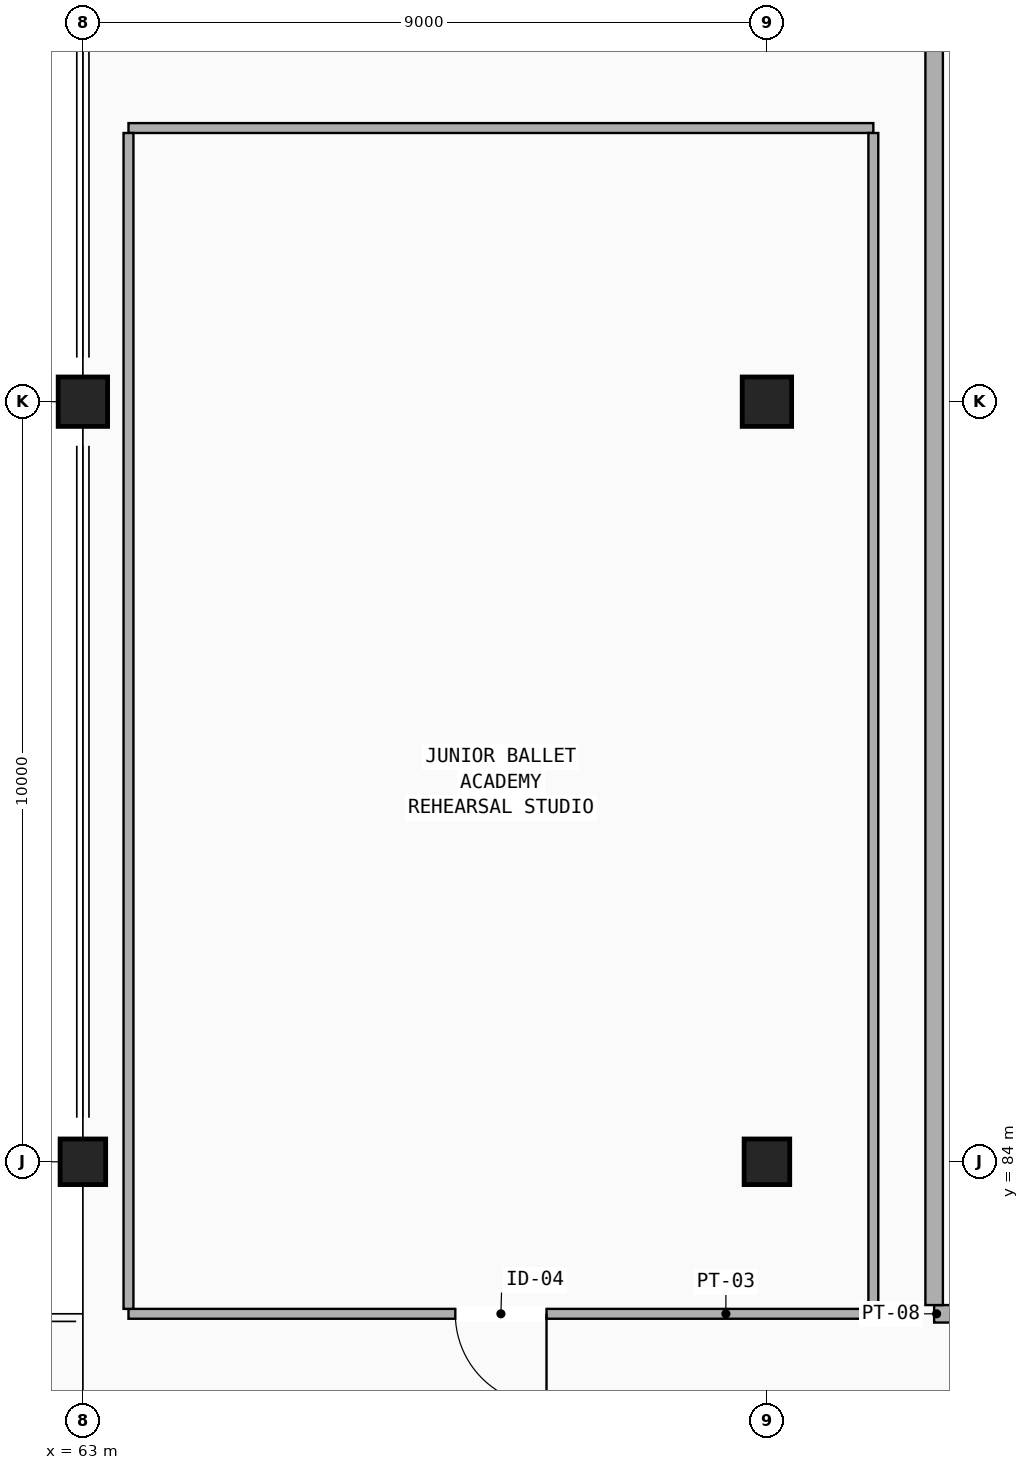
"""IFC4 building model, lengths in metres.
Left out: names, types, materials, properties, quantities, classifications, styles, units other than length and angle.
Written with IfcOpenShell. Run it as: python <this file> out.ifc"""

import sys

from ifc_helpers import new_model, si_unit, direction, frame, frame_2d, origin, origin_2d, place, context, subcontext, project, spatial, rectangle, extrude, element, fill, save


model = new_model("IFC4")
c1 = context("Model", 3, precision=1e-05, world=origin(), true_north=direction((0.0, 1.0)))
c2 = subcontext(c1, "Body", "Model", "MODEL_VIEW")
j1 = project(units=[si_unit("LENGTHUNIT", "METRE"), si_unit("PLANEANGLEUNIT", "RADIAN")], contexts=[c1])
p1 = place(None, origin())
s1 = spatial("IfcSite", under=j1, at=p1, CompositionType="ELEMENT")
p2 = place(p1, origin())
s2 = spatial("IfcBuilding", under=s1, at=p2, CompositionType="ELEMENT")
p3 = place(p2, frame((0.0, 0.0, 13.6)))
s3 = spatial("IfcBuildingStorey", under=s2, at=p3, CompositionType="ELEMENT", Elevation=13.6)
p4 = place(p3, frame((63.0, 84.0, 0.0), z_axis=(0.0, 0.0, 1.0), x_axis=(1.0, 0.0, 0.0)))
e1 = element("IfcColumn", 1, at=p4, inside=s3, PredefinedType="COLUMN", context=c2, shape_type="SweptSolid", body=[
    extrude(rectangle(XDim=0.6, YDim=0.6, at=origin_2d()), origin(), (0.0, 0.0, 1.0), 4.08),
])
p5 = place(p3, frame((63.0, 94.0, 0.0), z_axis=(0.0, 0.0, 1.0), x_axis=(1.0, 0.0, 0.0)))
e2 = element("IfcColumn", 2, at=p5, inside=s3, PredefinedType="COLUMN", context=c2, shape_type="SweptSolid", body=[
    extrude(rectangle(XDim=0.65, YDim=0.65, at=origin_2d()), origin(), (0.0, 0.0, 1.0), 4.08),
])
p6 = place(p3, frame((72.0, 84.0, 0.0), z_axis=(0.0, 0.0, 1.0), x_axis=(1.0, 0.0, 0.0)))
e3 = element("IfcColumn", 3, at=p6, inside=s3, PredefinedType="COLUMN", context=c2, shape_type="SweptSolid", body=[
    extrude(rectangle(XDim=0.6, YDim=0.6, at=origin_2d()), origin(), (0.0, 0.0, 1.0), 4.08),
])
p7 = place(p3, frame((72.0, 94.0, 0.0), z_axis=(0.0, 0.0, 1.0), x_axis=(1.0, 0.0, 0.0)))
e4 = element("IfcColumn", 4, at=p7, inside=s3, PredefinedType="COLUMN", context=c2, shape_type="SweptSolid", body=[
    extrude(rectangle(XDim=0.65, YDim=0.65, at=origin_2d()), origin(), (0.0, 0.0, 1.0), 4.08),
])
p8 = place(p3, frame((74.2, 82.0, 0.0), z_axis=(0.0, 0.0, 1.0), x_axis=(1.0, 0.0, 0.0)))
e5 = element("IfcWall", 5, at=p8, inside=s3, PredefinedType="PARTITIONING", context=c2, shape_type="SweptSolid", body=[
    extrude(rectangle(XDim=2.0, YDim=0.23, at=frame_2d((1.0, 0.0))), origin(), (0.0, 0.0, 1.0), 3.84),
])
p9 = place(p8, frame((0.45, 0.0, 0.0)))
e6 = element("IfcOpeningElement", 6, at=p9, cuts=e5, PredefinedType="OPENING", context=c2, shape_type="SweptSolid", body=[
    extrude(rectangle(XDim=1.1, YDim=2.2, at=frame_2d((0.55, 1.1))), frame((0.0, 0.125, 0.0), z_axis=(0.0, -1.0, 0.0), x_axis=(1.0, 0.0, 0.0)), (0.0, 0.0, 1.0), 0.25),
])
p10 = place(p3, frame((74.2, 82.115, 0.0), z_axis=(0.0, 0.0, 1.0), x_axis=(0.0, 1.0, 0.0)))
e7 = element("IfcWall", 7, at=p10, inside=s3, PredefinedType="PARTITIONING", context=c2, shape_type="SweptSolid", body=[
    extrude(rectangle(XDim=16.57, YDim=0.23, at=frame_2d((8.285, 0.0))), origin(), (0.0, 0.0, 1.0), 2.82),
])
p11 = place(p3, frame((63.6, 82.0, 0.0), z_axis=(0.0, 0.0, 1.0), x_axis=(1.0, 0.0, 0.0)))
e8 = element("IfcWall", 8, at=p11, inside=s3, PredefinedType="PARTITIONING", context=c2, shape_type="SweptSolid", body=[
    extrude(rectangle(XDim=9.8, YDim=0.13, at=frame_2d((4.9, 0.0))), origin(), (0.0, 0.0, 1.0), 2.94),
])
p12 = place(p11, frame((4.3, 0.0, 0.0)))
e9 = element("IfcOpeningElement", 9, at=p12, cuts=e8, PredefinedType="OPENING", context=c2, shape_type="SweptSolid", body=[
    extrude(rectangle(XDim=1.2, YDim=2.2, at=frame_2d((0.6, 1.1))), frame((0.0, 0.075, 0.0), z_axis=(0.0, -1.0, 0.0), x_axis=(1.0, 0.0, 0.0)), (0.0, 0.0, 1.0), 0.15),
])
p13 = place(p3, frame((63.6, 97.6, 0.0), z_axis=(0.0, 0.0, 1.0), x_axis=(1.0, 0.0, 0.0)))
e10 = element("IfcWall", 10, at=p13, inside=s3, PredefinedType="PARTITIONING", context=c2, shape_type="SweptSolid", body=[
    extrude(rectangle(XDim=9.8, YDim=0.13, at=frame_2d((4.9, 0.0))), origin(), (0.0, 0.0, 1.0), 3.14),
])
p14 = place(p3, frame((63.6, 82.065, 0.0), z_axis=(0.0, 0.0, 1.0), x_axis=(0.0, 1.0, 0.0)))
e11 = element("IfcWall", 11, at=p14, inside=s3, PredefinedType="PARTITIONING", context=c2, shape_type="SweptSolid", body=[
    extrude(rectangle(XDim=15.47, YDim=0.13, at=frame_2d((7.735, 0.0))), origin(), (0.0, 0.0, 1.0), 2.92),
])
p15 = place(p3, frame((73.4, 82.065, 0.0), z_axis=(0.0, 0.0, 1.0), x_axis=(0.0, 1.0, 0.0)))
e12 = element("IfcWall", 12, at=p15, inside=s3, PredefinedType="PARTITIONING", context=c2, shape_type="SweptSolid", body=[
    extrude(rectangle(XDim=15.47, YDim=0.13, at=frame_2d((7.735, 0.0))), origin(), (0.0, 0.0, 1.0), 2.82),
])
p16 = place(p12, frame((1.2, 0.0, 0.0), z_axis=(0.0, 0.0, 1.0), x_axis=(-1.0, 0.0, 0.0)))
e13 = element("IfcDoor", 13, at=p16, inside=s3, OperationType="SINGLE_SWING_LEFT", PredefinedType="DOOR", context=c2, shape_type="SweptSolid", body=[
    extrude(rectangle(XDim=1.2, YDim=2.2, at=frame_2d((0.6, 1.1))), frame((0.0, 0.025, 0.0), z_axis=(0.0, -1.0, 0.0), x_axis=(1.0, 0.0, 0.0)), (0.0, 0.0, 1.0), 0.05),
])
fill(e9, e13)
save(model, sys.argv[1])
